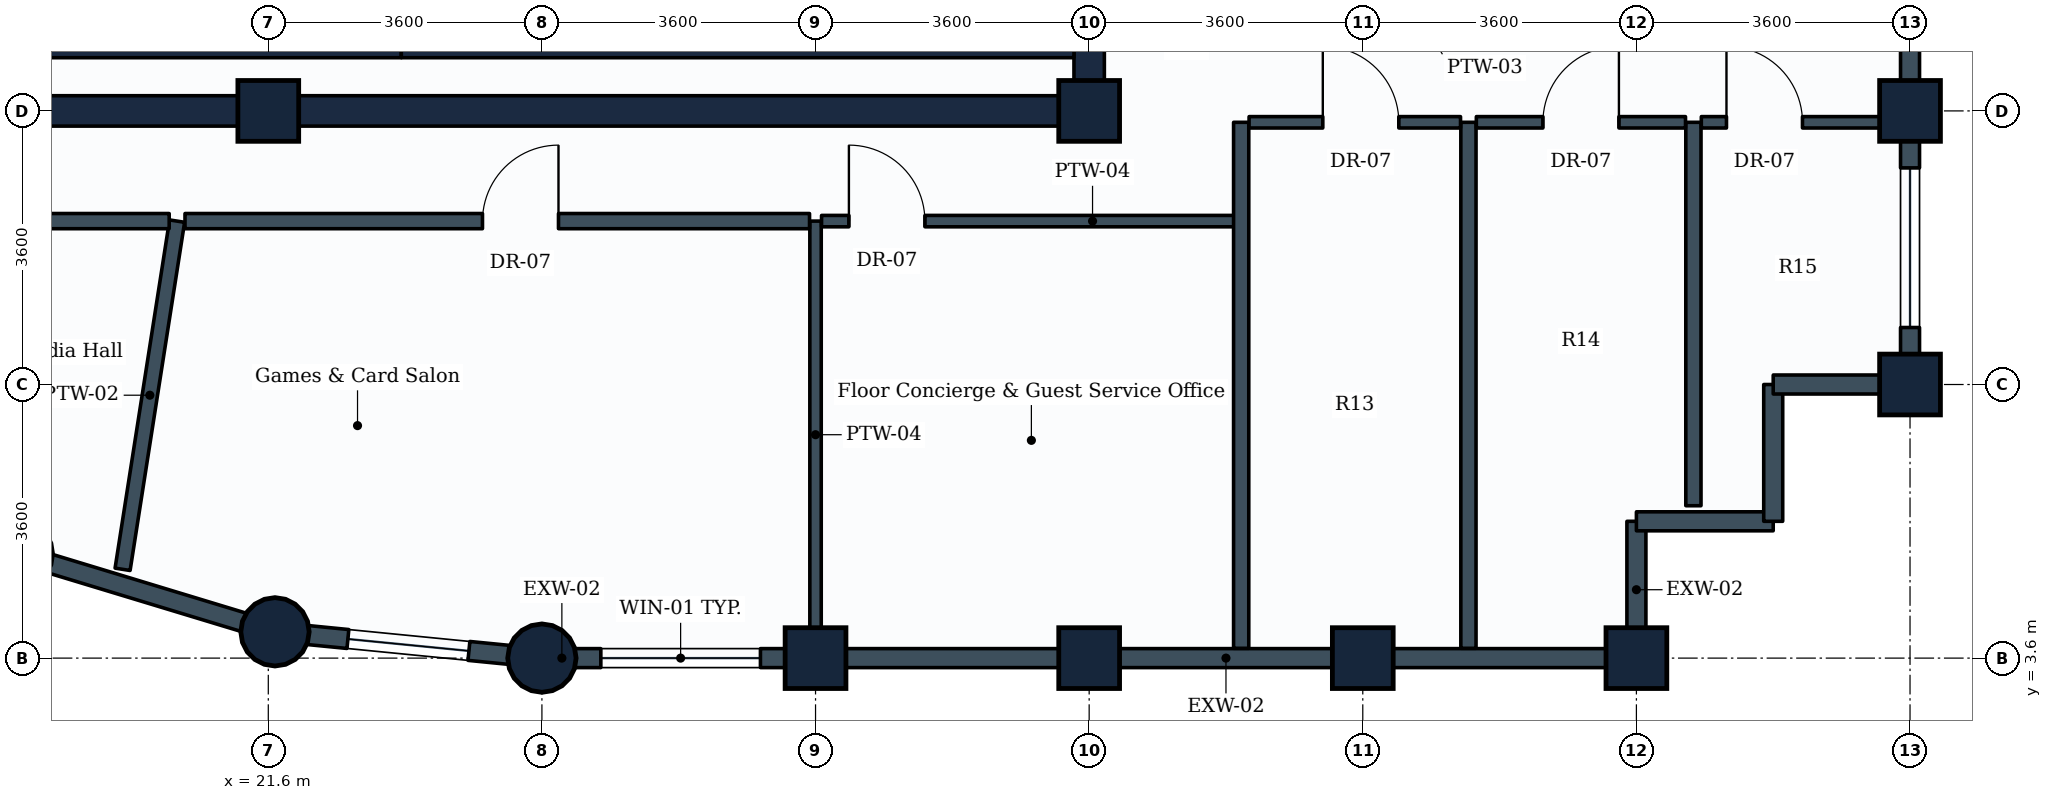
"""IFC4 building model, lengths in metres.
Left out: names, types, materials, properties, quantities, classifications, styles, units other than length and angle.
Written with IfcOpenShell. Run it as: python <this file> out.ifc"""

import sys

from ifc_helpers import new_model, si_unit, direction, frame, frame_2d, origin, origin_2d, place, context, subcontext, project, spatial, rectangle, circle, extrude, element, fill, save


model = new_model("IFC4")
c1 = context("Model", 3, precision=1e-05, world=origin(), true_north=direction((0.0, 1.0)))
c2 = subcontext(c1, "Body", "Model", "MODEL_VIEW")
j1 = project(units=[si_unit("LENGTHUNIT", "METRE"), si_unit("PLANEANGLEUNIT", "RADIAN")], contexts=[c1])
p1 = place(None, origin())
s1 = spatial("IfcSite", under=j1, at=p1, CompositionType="ELEMENT")
p2 = place(p1, origin())
s2 = spatial("IfcBuilding", under=s1, at=p2, CompositionType="ELEMENT")
p3 = place(p2, frame((0.0, 0.0, 231.8)))
s3 = spatial("IfcBuildingStorey", under=s2, at=p3, CompositionType="ELEMENT", Elevation=231.8)
p4 = place(p3, frame((18.312, 4.97, 0.0), z_axis=(0.0, 0.0, 1.0), x_axis=(1.0, 0.0, 0.0)))
e1 = element("IfcColumn", 1, at=p4, inside=s3, PredefinedType="COLUMN", context=c2, shape_type="SweptSolid", body=[
    extrude(circle(Radius=0.45, at=origin_2d()), origin(), (0.0, 0.0, 1.0), 3.6),
])
p5 = place(p3, frame((21.6, 10.8, 0.0), z_axis=(0.0, 0.0, 1.0), x_axis=(1.0, 0.0, 0.0)))
e2 = element("IfcColumn", 2, at=p5, inside=s3, PredefinedType="COLUMN", context=c2, shape_type="SweptSolid", body=[
    extrude(rectangle(XDim=0.8, YDim=0.8, at=origin_2d()), origin(), (0.0, 0.0, 1.0), 3.6),
])
for number, where, z_axis, x_axis in (
    (3, (21.688, 3.946, 0.0), (0.0, 0.0, 1.0), (1.0, 0.0, 0.0)),
    (4, (25.2, 3.6, 0.0), (0.0, 0.0, 1.0), (1.0, 0.0, 0.0)),
):
    element("IfcColumn", number, at=place(p3, frame(where, z_axis=z_axis, x_axis=x_axis)), inside=s3, PredefinedType="COLUMN", context=c2, shape_type="SweptSolid", body=[
        extrude(circle(Radius=0.45, at=origin_2d()), origin(), (0.0, 0.0, 1.0), 3.6),
    ])
for number, where, z_axis, x_axis in (
    (5, (28.8, 3.6, 0.0), (0.0, 0.0, 1.0), (1.0, 0.0, 0.0)),
    (6, (32.4, 3.6, 0.0), (0.0, 0.0, 1.0), (1.0, 0.0, 0.0)),
    (7, (32.4, 10.8, 0.0), (0.0, 0.0, 1.0), (1.0, 0.0, 0.0)),
    (8, (36.0, 3.6, 0.0), (0.0, 0.0, 1.0), (1.0, 0.0, 0.0)),
    (9, (39.6, 3.6, 0.0), (0.0, 0.0, 1.0), (1.0, 0.0, 0.0)),
    (10, (43.2, 7.2, 0.0), (0.0, 0.0, 1.0), (1.0, 0.0, 0.0)),
    (11, (43.2, 10.8, 0.0), (0.0, 0.0, 1.0), (0.0, 1.0, 0.0)),
):
    element("IfcColumn", number, at=place(p3, frame(where, z_axis=z_axis, x_axis=x_axis)), inside=s3, PredefinedType="COLUMN", context=c2, shape_type="SweptSolid", body=[
        extrude(rectangle(XDim=0.8, YDim=0.8, at=origin_2d()), origin(), (0.0, 0.0, 1.0), 3.6),
    ])
p6 = place(p3, frame((28.8, 3.6, 0.0), z_axis=(0.0, 0.0, 1.0), x_axis=(-1.0, 0.0, 0.0)))
e12 = element("IfcWall", 12, at=p6, inside=s3, PredefinedType="STANDARD", context=c2, shape_type="SweptSolid", body=[
    extrude(rectangle(XDim=3.6, YDim=0.25, at=frame_2d((1.8, 0.0))), origin(), (0.0, 0.0, 1.0), 2.83),
])
p7 = place(p6, frame((0.725, 0.0, 0.85)))
e13 = element("IfcOpeningElement", 13, at=p7, cuts=e12, PredefinedType="OPENING", context=c2, shape_type="SweptSolid", body=[
    extrude(rectangle(XDim=2.1, YDim=1.35, at=frame_2d((1.05, 0.675))), frame((0.0, 0.135, 0.0), z_axis=(0.0, -1.0, 0.0), x_axis=(1.0, 0.0, 0.0)), (0.0, 0.0, 1.0), 0.27),
])
p8 = place(p3, frame((32.4, 3.6, 0.0), z_axis=(0.0, 0.0, 1.0), x_axis=(-1.0, 0.0, 0.0)))
e14 = element("IfcWall", 14, at=p8, inside=s3, PredefinedType="STANDARD", context=c2, shape_type="SweptSolid", body=[
    extrude(rectangle(XDim=3.6, YDim=0.25, at=frame_2d((1.8, 0.0))), origin(), (0.0, 0.0, 1.0), 2.83),
])
for number, where, z_axis, x_axis in (
    (15, (36.0, 3.6, 0.0), (0.0, 0.0, 1.0), (-1.0, 0.0, 0.0)),
    (16, (39.6, 3.6, 0.0), (0.0, 0.0, 1.0), (-1.0, 0.0, 0.0)),
):
    element("IfcWall", number, at=place(p3, frame(where, z_axis=z_axis, x_axis=x_axis)), inside=s3, PredefinedType="STANDARD", context=c2, shape_type="SweptSolid", body=[
        extrude(rectangle(XDim=3.6, YDim=0.25, at=frame_2d((1.8, 0.0))), origin(), (0.0, 0.0, 1.0), 2.83),
    ])
p9 = place(p3, frame((39.6, 5.4, 0.0), z_axis=(0.0, 0.0, 1.0), x_axis=(0.0, -1.0, 0.0)))
e17 = element("IfcWall", 17, at=p9, inside=s3, PredefinedType="STANDARD", context=c2, shape_type="SweptSolid", body=[
    extrude(rectangle(XDim=1.8, YDim=0.25, at=frame_2d((0.9, 0.0))), origin(), (0.0, 0.0, 1.0), 2.83),
])
p10 = place(p3, frame((41.4, 5.4, 0.0), z_axis=(0.0, 0.0, 1.0), x_axis=(-1.0, 0.0, 0.0)))
e18 = element("IfcWall", 18, at=p10, inside=s3, PredefinedType="STANDARD", context=c2, shape_type="SweptSolid", body=[
    extrude(rectangle(XDim=1.8, YDim=0.25, at=frame_2d((0.9, 0.0))), origin(), (0.0, 0.0, 1.0), 3.335),
])
p11 = place(p3, frame((41.4, 7.2, 0.0), z_axis=(0.0, 0.0, 1.0), x_axis=(0.0, -1.0, 0.0)))
e19 = element("IfcWall", 19, at=p11, inside=s3, PredefinedType="STANDARD", context=c2, shape_type="SweptSolid", body=[
    extrude(rectangle(XDim=1.8, YDim=0.25, at=frame_2d((0.9, 0.0))), origin(), (0.0, 0.0, 1.0), 3.335),
])
p12 = place(p3, frame((43.2, 7.2, 0.0), z_axis=(0.0, 0.0, 1.0), x_axis=(-1.0, 0.0, 0.0)))
e20 = element("IfcWall", 20, at=p12, inside=s3, PredefinedType="STANDARD", context=c2, shape_type="SweptSolid", body=[
    extrude(rectangle(XDim=1.8, YDim=0.25, at=frame_2d((0.9, 0.0))), origin(), (0.0, 0.0, 1.0), 2.83),
])
p13 = place(p3, frame((43.2, 10.8, 0.0), z_axis=(0.0, 0.0, 1.0), x_axis=(0.0, -1.0, 0.0)))
e21 = element("IfcWall", 21, at=p13, inside=s3, PredefinedType="STANDARD", context=c2, shape_type="SweptSolid", body=[
    extrude(rectangle(XDim=3.6, YDim=0.25, at=frame_2d((1.8, 0.0))), origin(), (0.0, 0.0, 1.0), 2.83),
])
p14 = place(p13, frame((0.75, 0.0, 0.85)))
e22 = element("IfcOpeningElement", 22, at=p14, cuts=e21, PredefinedType="OPENING", context=c2, shape_type="SweptSolid", body=[
    extrude(rectangle(XDim=2.1, YDim=1.35, at=frame_2d((1.05, 0.675))), frame((0.0, 0.135, 0.0), z_axis=(0.0, -1.0, 0.0), x_axis=(1.0, 0.0, 0.0)), (0.0, 0.0, 1.0), 0.27),
])
p15 = place(p3, frame((43.2, 14.4, 0.0), z_axis=(0.0, 0.0, 1.0), x_axis=(0.0, -1.0, 0.0)))
e23 = element("IfcWall", 23, at=p15, inside=s3, PredefinedType="STANDARD", context=c2, shape_type="SweptSolid", body=[
    extrude(rectangle(XDim=3.6, YDim=0.25, at=frame_2d((1.8, 0.0))), origin(), (0.0, 0.0, 1.0), 2.83),
])
p16 = place(p3, frame((21.688, 3.946, 0.0), z_axis=(0.0, 0.0, 1.0), x_axis=(-0.956953367403, 0.290241714123, 0.0)))
e24 = element("IfcWall", 24, at=p16, inside=s3, PredefinedType="STANDARD", context=c2, shape_type="SweptSolid", body=[
    extrude(rectangle(XDim=3.528, YDim=0.25, at=frame_2d((1.764, 0.0))), origin(), (0.0, 0.0, 1.0), 2.83),
])
p17 = place(p3, frame((25.2, 3.6, 0.0), z_axis=(0.0, 0.0, 1.0), x_axis=(-0.995183369056, 0.098030923459, 0.0)))
e25 = element("IfcWall", 25, at=p17, inside=s3, PredefinedType="STANDARD", context=c2, shape_type="SweptSolid", body=[
    extrude(rectangle(XDim=3.529, YDim=0.25, at=frame_2d((1.765, 0.0))), origin(), (0.0, 0.0, 1.0), 2.83),
])
p18 = place(p17, frame((0.965, 0.0, 0.85)))
e26 = element("IfcOpeningElement", 26, at=p18, cuts=e25, PredefinedType="OPENING", context=c2, shape_type="SweptSolid", body=[
    extrude(rectangle(XDim=1.6, YDim=1.35, at=frame_2d((0.8, 0.675))), frame((0.0, 0.135, 0.0), z_axis=(0.0, -1.0, 0.0), x_axis=(1.0, 0.0, 0.0)), (0.0, 0.0, 1.0), 0.27),
])
p19 = place(p3, frame((14.4, 10.8, 0.0), z_axis=(0.0, 0.0, 1.0), x_axis=(1.0, 0.0, 0.0)))
e27 = element("IfcWall", 27, at=p19, inside=s3, PredefinedType="SHEAR", context=c2, shape_type="SweptSolid", body=[
    extrude(rectangle(XDim=18.0, YDim=0.4, at=frame_2d((9.0, 0.0))), origin(), (0.0, 0.0, 1.0), 3.35),
])
p20 = place(p3, frame((32.4, 10.8, 0.0), z_axis=(0.0, 0.0, 1.0), x_axis=(0.0, 1.0, 0.0)))
e28 = element("IfcWall", 28, at=p20, inside=s3, PredefinedType="SHEAR", context=c2, shape_type="SweptSolid", body=[
    extrude(rectangle(XDim=14.4, YDim=0.4, at=frame_2d((7.2, 0.0))), origin(), (0.0, 0.0, 1.0), 3.35),
])
p21 = place(p20, frame((4.35, 0.0, 0.0)))
e29 = element("IfcOpeningElement", 29, at=p21, cuts=e28, PredefinedType="OPENING", context=c2, shape_type="SweptSolid", body=[
    extrude(rectangle(XDim=1.2, YDim=2.1, at=frame_2d((0.6, 1.05))), frame((0.0, 0.21, 0.0), z_axis=(0.0, -1.0, 0.0), x_axis=(1.0, 0.0, 0.0)), (0.0, 0.0, 1.0), 0.42),
])
p22 = place(p20, frame((10.0, 0.0, 0.0)))
e30 = element("IfcOpeningElement", 30, at=p22, cuts=e28, PredefinedType="OPENING", context=c2, shape_type="SweptSolid", body=[
    extrude(rectangle(XDim=1.2, YDim=2.1, at=frame_2d((0.6, 1.05))), frame((0.0, 0.21, 0.0), z_axis=(0.0, -1.0, 0.0), x_axis=(1.0, 0.0, 0.0)), (0.0, 0.0, 1.0), 0.42),
])
p23 = place(p3, frame((14.6, 11.625, 0.0), z_axis=(0.0, 0.0, 1.0), x_axis=(1.0, 0.0, 0.0)))
e31 = element("IfcWall", 31, at=p23, inside=s3, PredefinedType="SHEAR", context=c2, shape_type="SweptSolid", body=[
    extrude(rectangle(XDim=8.75, YDim=0.25, at=frame_2d((4.375, 0.0))), origin(), (0.0, 0.0, 1.0), 3.35),
])
p24 = place(p3, frame((23.35, 11.625, 0.0), z_axis=(0.0, 0.0, 1.0), x_axis=(1.0, 0.0, 0.0)))
e32 = element("IfcWall", 32, at=p24, inside=s3, PredefinedType="SHEAR", context=c2, shape_type="SweptSolid", body=[
    extrude(rectangle(XDim=8.85, YDim=0.25, at=frame_2d((4.425, 0.0))), origin(), (0.0, 0.0, 1.0), 3.35),
])
p25 = place(p3, frame((28.8, 9.35, 0.0), z_axis=(0.0, 0.0, 1.0), x_axis=(0.0, -1.0, 0.0)))
e33 = element("IfcWall", 33, at=p25, inside=s3, PredefinedType="PARTITIONING", context=c2, shape_type="SweptSolid", body=[
    extrude(rectangle(XDim=5.621, YDim=0.15, at=frame_2d((2.811, 0.0))), origin(), (0.0, 0.0, 1.0), 3.335),
])
p26 = place(p3, frame((20.4, 9.35, 0.0), z_axis=(0.0, 0.0, 1.0), x_axis=(-0.154564772307, -0.987982657318, 0.0)))
e34 = element("IfcWall", 34, at=p26, inside=s3, PredefinedType="PARTITIONING", context=c2, shape_type="SweptSolid", body=[
    extrude(rectangle(XDim=4.637, YDim=0.2, at=frame_2d((2.319, 0.0))), origin(), (0.0, 0.0, 1.0), 2.83),
])
p27 = place(p3, frame((12.95, 9.35, 0.0), z_axis=(0.0, 0.0, 1.0), x_axis=(1.0, 0.0, 0.0)))
e35 = element("IfcWall", 35, at=p27, inside=s3, PredefinedType="PARTITIONING", context=c2, shape_type="SweptSolid", body=[
    extrude(rectangle(XDim=7.346, YDim=0.2, at=frame_2d((3.673, 0.0))), origin(), (0.0, 0.0, 1.0), 3.02),
])
p28 = place(p27, frame((4.261, 0.0, 0.0)))
e36 = element("IfcOpeningElement", 36, at=p28, cuts=e35, PredefinedType="OPENING", context=c2, shape_type="SweptSolid", body=[
    extrude(rectangle(XDim=1.0, YDim=2.1, at=frame_2d((0.5, 1.05))), frame((0.0, 0.11, 0.0), z_axis=(0.0, -1.0, 0.0), x_axis=(1.0, 0.0, 0.0)), (0.0, 0.0, 1.0), 0.22),
])
p29 = place(p3, frame((20.504, 9.35, 0.0), z_axis=(0.0, 0.0, 1.0), x_axis=(1.0, 0.0, 0.0)))
e37 = element("IfcWall", 37, at=p29, inside=s3, PredefinedType="PARTITIONING", context=c2, shape_type="SweptSolid", body=[
    extrude(rectangle(XDim=8.217, YDim=0.2, at=frame_2d((4.108, 0.0))), origin(), (0.0, 0.0, 1.0), 3.02),
])
p30 = place(p29, frame((3.914, 0.0, 0.0)))
e38 = element("IfcOpeningElement", 38, at=p30, cuts=e37, PredefinedType="OPENING", context=c2, shape_type="SweptSolid", body=[
    extrude(rectangle(XDim=1.0, YDim=2.1, at=frame_2d((0.5, 1.05))), frame((0.0, 0.11, 0.0), z_axis=(0.0, -1.0, 0.0), x_axis=(1.0, 0.0, 0.0)), (0.0, 0.0, 1.0), 0.22),
])
p31 = place(p3, frame((28.879, 9.35, 0.0), z_axis=(0.0, 0.0, 1.0), x_axis=(1.0, 0.0, 0.0)))
e39 = element("IfcWall", 39, at=p31, inside=s3, PredefinedType="PARTITIONING", context=c2, shape_type="SweptSolid", body=[
    extrude(rectangle(XDim=5.521, YDim=0.15, at=frame_2d((2.76, 0.0))), origin(), (0.0, 0.0, 1.0), 3.335),
])
p32 = place(p31, frame((0.36, 0.0, 0.0)))
e40 = element("IfcOpeningElement", 40, at=p32, cuts=e39, PredefinedType="OPENING", context=c2, shape_type="SweptSolid", body=[
    extrude(rectangle(XDim=1.0, YDim=2.1, at=frame_2d((0.5, 1.05))), frame((0.0, 0.085, 0.0), z_axis=(0.0, -1.0, 0.0), x_axis=(1.0, 0.0, 0.0)), (0.0, 0.0, 1.0), 0.17),
])
for number, where, z_axis, x_axis in (
    (41, (34.4, 3.729, 0.0), (0.0, 0.0, 1.0), (0.0, 1.0, 0.0)),
    (42, (37.39, 3.729, 0.0), (0.0, 0.0, 1.0), (0.0, 1.0, 0.0)),
):
    element("IfcWall", number, at=place(p3, frame(where, z_axis=z_axis, x_axis=x_axis)), inside=s3, PredefinedType="PARTITIONING", context=c2, shape_type="SweptSolid", body=[
        extrude(rectangle(XDim=6.921, YDim=0.2, at=frame_2d((3.46, 0.0))), origin(), (0.0, 0.0, 1.0), 2.83),
    ])
p33 = place(p3, frame((34.504, 10.65, 0.0), z_axis=(0.0, 0.0, 1.0), x_axis=(1.0, 0.0, 0.0)))
e43 = element("IfcWall", 43, at=p33, inside=s3, PredefinedType="PARTITIONING", context=c2, shape_type="SweptSolid", body=[
    extrude(rectangle(XDim=2.782, YDim=0.15, at=frame_2d((1.391, 0.0))), origin(), (0.0, 0.0, 1.0), 3.02),
])
p34 = place(p33, frame((0.97, 0.0, 0.0)))
e44 = element("IfcOpeningElement", 44, at=p34, cuts=e43, PredefinedType="OPENING", context=c2, shape_type="SweptSolid", body=[
    extrude(rectangle(XDim=1.0, YDim=2.1, at=frame_2d((0.5, 1.05))), frame((0.0, 0.085, 0.0), z_axis=(0.0, -1.0, 0.0), x_axis=(1.0, 0.0, 0.0)), (0.0, 0.0, 1.0), 0.17),
])
p35 = place(p3, frame((40.35, 5.605, 0.0), z_axis=(0.0, 0.0, 1.0), x_axis=(0.0, 1.0, 0.0)))
e45 = element("IfcWall", 45, at=p35, inside=s3, PredefinedType="PARTITIONING", context=c2, shape_type="SweptSolid", body=[
    extrude(rectangle(XDim=5.045, YDim=0.2, at=frame_2d((2.522, 0.0))), origin(), (0.0, 0.0, 1.0), 3.335),
])
p36 = place(p3, frame((37.494, 10.65, 0.0), z_axis=(0.0, 0.0, 1.0), x_axis=(1.0, 0.0, 0.0)))
e46 = element("IfcWall", 46, at=p36, inside=s3, PredefinedType="PARTITIONING", context=c2, shape_type="SweptSolid", body=[
    extrude(rectangle(XDim=2.752, YDim=0.15, at=frame_2d((1.376, 0.0))), origin(), (0.0, 0.0, 1.0), 3.335),
])
p37 = place(p36, frame((0.876, 0.0, 0.0)))
e47 = element("IfcOpeningElement", 47, at=p37, cuts=e46, PredefinedType="OPENING", context=c2, shape_type="SweptSolid", body=[
    extrude(rectangle(XDim=1.0, YDim=2.1, at=frame_2d((0.5, 1.05))), frame((0.0, 0.085, 0.0), z_axis=(0.0, -1.0, 0.0), x_axis=(1.0, 0.0, 0.0)), (0.0, 0.0, 1.0), 0.17),
])
p38 = place(p3, frame((40.454, 10.65, 0.0), z_axis=(0.0, 0.0, 1.0), x_axis=(1.0, 0.0, 0.0)))
e48 = element("IfcWall", 48, at=p38, inside=s3, PredefinedType="PARTITIONING", context=c2, shape_type="SweptSolid", body=[
    extrude(rectangle(XDim=2.617, YDim=0.15, at=frame_2d((1.309, 0.0))), origin(), (0.0, 0.0, 1.0), 2.83),
])
p39 = place(p38, frame((0.331, 0.0, 0.0)))
e49 = element("IfcOpeningElement", 49, at=p39, cuts=e48, PredefinedType="OPENING", context=c2, shape_type="SweptSolid", body=[
    extrude(rectangle(XDim=1.0, YDim=2.1, at=frame_2d((0.5, 1.05))), frame((0.0, 0.085, 0.0), z_axis=(0.0, -1.0, 0.0), x_axis=(1.0, 0.0, 0.0)), (0.0, 0.0, 1.0), 0.17),
])
p40 = place(p7, origin())
e50 = element("IfcWindow", 50, at=p40, inside=s3, PartitioningType="SINGLE_PANEL", PredefinedType="WINDOW", context=c2, shape_type="SweptSolid", body=[
    extrude(rectangle(XDim=2.1, YDim=1.35, at=frame_2d((1.05, 0.675))), frame((0.0, 0.03, 0.0), z_axis=(0.0, -1.0, 0.0), x_axis=(1.0, 0.0, 0.0)), (0.0, 0.0, 1.0), 0.06),
])
fill(e13, e50)
p41 = place(p14, origin())
e51 = element("IfcWindow", 51, at=p41, inside=s3, PartitioningType="SINGLE_PANEL", PredefinedType="WINDOW", context=c2, shape_type="SweptSolid", body=[
    extrude(rectangle(XDim=2.1, YDim=1.35, at=frame_2d((1.05, 0.675))), frame((0.0, 0.03, 0.0), z_axis=(0.0, -1.0, 0.0), x_axis=(1.0, 0.0, 0.0)), (0.0, 0.0, 1.0), 0.06),
])
fill(e22, e51)
p42 = place(p18, origin())
e52 = element("IfcWindow", 52, at=p42, inside=s3, PartitioningType="SINGLE_PANEL", PredefinedType="WINDOW", context=c2, shape_type="SweptSolid", body=[
    extrude(rectangle(XDim=1.6, YDim=1.35, at=frame_2d((0.8, 0.675))), frame((0.0, 0.03, 0.0), z_axis=(0.0, -1.0, 0.0), x_axis=(1.0, 0.0, 0.0)), (0.0, 0.0, 1.0), 0.06),
])
fill(e26, e52)
p43 = place(p30, origin())
e53 = element("IfcDoor", 53, at=p43, inside=s3, OperationType="SINGLE_SWING_RIGHT", PredefinedType="DOOR", context=c2, shape_type="SweptSolid", body=[
    extrude(rectangle(XDim=1.0, YDim=2.1, at=frame_2d((0.5, 1.05))), frame((0.0, 0.025, 0.0), z_axis=(0.0, -1.0, 0.0), x_axis=(1.0, 0.0, 0.0)), (0.0, 0.0, 1.0), 0.05),
])
fill(e38, e53)
p44 = place(p32, origin())
e54 = element("IfcDoor", 54, at=p44, inside=s3, OperationType="SINGLE_SWING_LEFT", PredefinedType="DOOR", context=c2, shape_type="SweptSolid", body=[
    extrude(rectangle(XDim=1.0, YDim=2.1, at=frame_2d((0.5, 1.05))), frame((0.0, 0.025, 0.0), z_axis=(0.0, -1.0, 0.0), x_axis=(1.0, 0.0, 0.0)), (0.0, 0.0, 1.0), 0.05),
])
fill(e40, e54)
p45 = place(p34, origin())
e55 = element("IfcDoor", 55, at=p45, inside=s3, OperationType="SINGLE_SWING_LEFT", PredefinedType="DOOR", context=c2, shape_type="SweptSolid", body=[
    extrude(rectangle(XDim=1.0, YDim=2.1, at=frame_2d((0.5, 1.05))), frame((0.0, 0.025, 0.0), z_axis=(0.0, -1.0, 0.0), x_axis=(1.0, 0.0, 0.0)), (0.0, 0.0, 1.0), 0.05),
])
fill(e44, e55)
p46 = place(p37, origin())
e56 = element("IfcDoor", 56, at=p46, inside=s3, OperationType="SINGLE_SWING_RIGHT", PredefinedType="DOOR", context=c2, shape_type="SweptSolid", body=[
    extrude(rectangle(XDim=1.0, YDim=2.1, at=frame_2d((0.5, 1.05))), frame((0.0, 0.025, 0.0), z_axis=(0.0, -1.0, 0.0), x_axis=(1.0, 0.0, 0.0)), (0.0, 0.0, 1.0), 0.05),
])
fill(e47, e56)
p47 = place(p39, origin())
e57 = element("IfcDoor", 57, at=p47, inside=s3, OperationType="SINGLE_SWING_LEFT", PredefinedType="DOOR", context=c2, shape_type="SweptSolid", body=[
    extrude(rectangle(XDim=1.0, YDim=2.1, at=frame_2d((0.5, 1.05))), frame((0.0, 0.025, 0.0), z_axis=(0.0, -1.0, 0.0), x_axis=(1.0, 0.0, 0.0)), (0.0, 0.0, 1.0), 0.05),
])
fill(e49, e57)
save(model, sys.argv[1])
